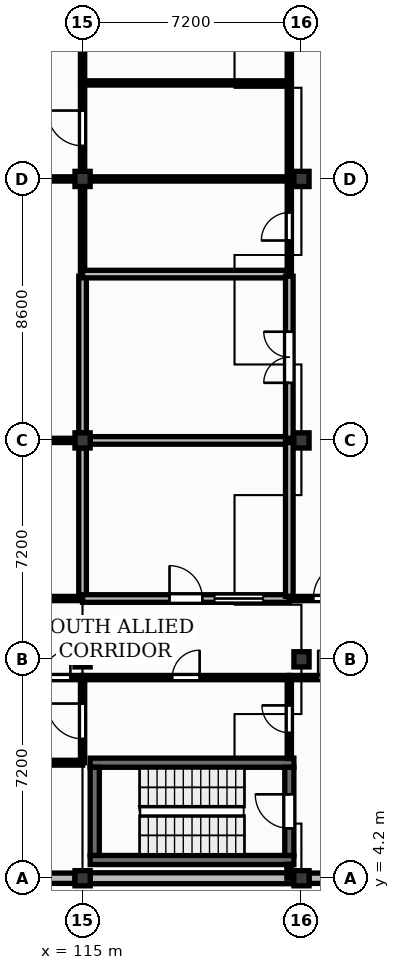
"""IFC4 building model, lengths in metres.
Left out: names, types, materials, properties, quantities, classifications, styles, units other than length and angle.
Written with IfcOpenShell. Run it as: python <this file> out.ifc"""

import sys

from ifc_helpers import new_model, si_unit, direction, frame, frame_2d, origin, origin_2d, place, context, subcontext, project, spatial, rectangle, extrude, element, fill, save


model = new_model("IFC4")
c1 = context("Model", 3, precision=1e-05, world=origin(), true_north=direction((0.0, 1.0)))
c2 = subcontext(c1, "Body", "Model", "MODEL_VIEW")
j1 = project(units=[si_unit("LENGTHUNIT", "METRE"), si_unit("PLANEANGLEUNIT", "RADIAN")], contexts=[c1])
p1 = place(None, origin())
s1 = spatial("IfcSite", under=j1, at=p1, CompositionType="ELEMENT")
p2 = place(p1, origin())
s2 = spatial("IfcBuilding", under=s1, at=p2, CompositionType="ELEMENT")
p3 = place(p2, frame((0.0, 0.0, 4.5)))
s3 = spatial("IfcBuildingStorey", under=s2, at=p3, CompositionType="ELEMENT", Elevation=4.5)
for number, where, z_axis, x_axis in (
    (1, (115.0, 4.2, 0.0), (0.0, 0.0, 1.0), (1.0, 0.0, 0.0)),
    (2, (115.0, 11.4, 0.0), (0.0, 0.0, 1.0), (1.0, 0.0, 0.0)),
    (3, (115.0, 18.6, 0.0), (0.0, 0.0, 1.0), (1.0, 0.0, 0.0)),
    (4, (115.0, 27.2, 0.0), (0.0, 0.0, 1.0), (1.0, 0.0, 0.0)),
    (5, (122.2, 4.2, 0.0), (0.0, 0.0, 1.0), (1.0, 0.0, 0.0)),
    (6, (122.2, 11.4, 0.0), (0.0, 0.0, 1.0), (1.0, 0.0, 0.0)),
    (7, (122.2, 18.6, 0.0), (0.0, 0.0, 1.0), (1.0, 0.0, 0.0)),
    (8, (122.2, 27.2, 0.0), (0.0, 0.0, 1.0), (1.0, 0.0, 0.0)),
):
    element("IfcColumn", number, at=place(p3, frame(where, z_axis=z_axis, x_axis=x_axis)), inside=s3, PredefinedType="COLUMN", context=c2, shape_type="SweptSolid", body=[
        extrude(rectangle(XDim=0.5, YDim=0.5, at=origin_2d()), origin(), (0.0, 0.0, 1.0), 4.22),
    ])
p4 = place(p3, frame((107.96, 4.2, 0.0), z_axis=(0.0, 0.0, 1.0), x_axis=(1.0, 0.0, 0.0)))
e9 = element("IfcWall", 9, at=p4, inside=s3, PredefinedType="SOLIDWALL", context=c2, shape_type="SweptSolid", body=[
    extrude(rectangle(XDim=6.79, YDim=0.34, at=frame_2d((3.395, 0.0))), origin(), (0.0, 0.0, 1.0), 3.76),
])
p5 = place(p4, frame((1.42, 0.0, 1.0)))
e10 = element("IfcOpeningElement", 10, at=p5, cuts=e9, PredefinedType="OPENING", context=c2, shape_type="SweptSolid", body=[
    extrude(rectangle(XDim=1.72, YDim=2.2, at=frame_2d((0.86, 1.1))), frame((0.0, 0.18, 0.0), z_axis=(0.0, -1.0, 0.0), x_axis=(1.0, 0.0, 0.0)), (0.0, 0.0, 1.0), 0.36),
])
p6 = place(p3, frame((115.25, 4.2, 0.0), z_axis=(0.0, 0.0, 1.0), x_axis=(1.0, 0.0, 0.0)))
e11 = element("IfcWall", 11, at=p6, inside=s3, PredefinedType="SOLIDWALL", context=c2, shape_type="SweptSolid", body=[
    extrude(rectangle(XDim=6.7, YDim=0.36, at=frame_2d((3.35, 0.0))), origin(), (0.0, 0.0, 1.0), 3.52),
])
p7 = place(p3, frame((122.45, 4.2, 0.0), z_axis=(0.0, 0.0, 1.0), x_axis=(1.0, 0.0, 0.0)))
e12 = element("IfcWall", 12, at=p7, inside=s3, PredefinedType="SOLIDWALL", context=c2, shape_type="SweptSolid", body=[
    extrude(rectangle(XDim=5.9, YDim=0.34, at=frame_2d((2.95, 0.0))), origin(), (0.0, 0.0, 1.0), 3.52),
])
p8 = place(p7, frame((3.39, 0.0, 1.5)))
e13 = element("IfcOpeningElement", 13, at=p8, cuts=e12, PredefinedType="OPENING", context=c2, shape_type="SweptSolid", body=[
    extrude(rectangle(XDim=1.15, YDim=1.25, at=frame_2d((0.575, 0.625))), frame((0.0, 0.18, 0.0), z_axis=(0.0, -1.0, 0.0), x_axis=(1.0, 0.0, 0.0)), (0.0, 0.0, 1.0), 0.36),
])
for number, where, z_axis, x_axis in (
    (14, (115.25, 4.8, 0.0), (0.0, 0.0, 1.0), (1.0, 0.0, 0.0)),
    (15, (115.25, 8.0, 0.0), (0.0, 0.0, 1.0), (1.0, 0.0, 0.0)),
):
    element("IfcWall", number, at=place(p3, frame(where, z_axis=z_axis, x_axis=x_axis)), inside=s3, PredefinedType="SHEAR", context=c2, shape_type="SweptSolid", body=[
        extrude(rectangle(XDim=6.7, YDim=0.3, at=frame_2d((3.35, 0.0))), origin(), (0.0, 0.0, 1.0), 4.25),
    ])
p9 = place(p3, frame((115.4, 4.95, 0.0), z_axis=(0.0, 0.0, 1.0), x_axis=(0.0, 1.0, 0.0)))
e16 = element("IfcWall", 16, at=p9, inside=s3, PredefinedType="SHEAR", context=c2, shape_type="SweptSolid", body=[
    extrude(rectangle(XDim=2.9, YDim=0.3, at=frame_2d((1.45, 0.0))), origin(), (0.0, 0.0, 1.0), 4.25),
])
p10 = place(p3, frame((121.8, 4.95, 0.0), z_axis=(0.0, 0.0, 1.0), x_axis=(0.0, 1.0, 0.0)))
e17 = element("IfcWall", 17, at=p10, inside=s3, PredefinedType="SHEAR", context=c2, shape_type="SweptSolid", body=[
    extrude(rectangle(XDim=2.9, YDim=0.3, at=frame_2d((1.45, 0.0))), origin(), (0.0, 0.0, 1.0), 4.25),
])
p11 = place(p10, frame((0.89, 0.0, 0.0)))
e18 = element("IfcOpeningElement", 18, at=p11, cuts=e17, PredefinedType="OPENING", context=c2, shape_type="SweptSolid", body=[
    extrude(rectangle(XDim=1.12, YDim=2.1, at=frame_2d((0.56, 1.05))), frame((0.0, 0.16, 0.0), z_axis=(0.0, -1.0, 0.0), x_axis=(1.0, 0.0, 0.0)), (0.0, 0.0, 1.0), 0.32),
])
p12 = place(p3, frame((110.6, 13.4, 0.0), z_axis=(0.0, 0.0, 1.0), x_axis=(1.0, 0.0, 0.0)))
e19 = element("IfcWall", 19, at=p12, inside=s3, PredefinedType="PARTITIONING", context=c2, shape_type="SweptSolid", body=[
    extrude(rectangle(XDim=4.4, YDim=0.14, at=frame_2d((2.2, 0.0))), origin(), (0.0, 0.0, 1.0), 4.18),
])
p13 = place(p3, frame((110.6, 18.6, 0.0), z_axis=(0.0, 0.0, 1.0), x_axis=(1.0, 0.0, 0.0)))
e20 = element("IfcWall", 20, at=p13, inside=s3, PredefinedType="PARTITIONING", context=c2, shape_type="SweptSolid", body=[
    extrude(rectangle(XDim=4.15, YDim=0.14, at=frame_2d((2.075, 0.0))), origin(), (0.0, 0.0, 1.0), 3.76),
])
p14 = place(p3, frame((110.6, 27.2, 0.0), z_axis=(0.0, 0.0, 1.0), x_axis=(1.0, 0.0, 0.0)))
e21 = element("IfcWall", 21, at=p14, inside=s3, PredefinedType="PARTITIONING", context=c2, shape_type="SweptSolid", body=[
    extrude(rectangle(XDim=4.15, YDim=0.14, at=frame_2d((2.075, 0.0))), origin(), (0.0, 0.0, 1.0), 3.87),
])
p15 = place(p3, frame((112.4, 10.8, 0.0), z_axis=(0.0, 0.0, 1.0), x_axis=(1.0, 0.0, 0.0)))
e22 = element("IfcWall", 22, at=p15, inside=s3, PredefinedType="PARTITIONING", context=c2, shape_type="SweptSolid", body=[
    extrude(rectangle(XDim=2.6, YDim=0.14, at=frame_2d((1.3, 0.0))), origin(), (0.0, 0.0, 1.0), 4.18),
])
p16 = place(p15, frame((0.4, 0.0, 0.0)))
e23 = element("IfcOpeningElement", 23, at=p16, cuts=e22, PredefinedType="OPENING", context=c2, shape_type="SweptSolid", body=[
    extrude(rectangle(XDim=1.8, YDim=2.3, at=frame_2d((0.9, 1.15))), frame((0.0, 0.08, 0.0), z_axis=(0.0, -1.0, 0.0), x_axis=(1.0, 0.0, 0.0)), (0.0, 0.0, 1.0), 0.16),
])
p17 = place(p3, frame((115.0, 8.0, 0.0), z_axis=(0.0, 0.0, 1.0), x_axis=(0.0, 1.0, 0.0)))
e24 = element("IfcWall", 24, at=p17, inside=s3, PredefinedType="PARTITIONING", context=c2, shape_type="SweptSolid", body=[
    extrude(rectangle(XDim=2.73, YDim=0.14, at=frame_2d((1.365, 0.0))), origin(), (0.0, 0.0, 1.0), 3.52),
])
p18 = place(p17, frame((0.785, 0.0, 0.0)))
e25 = element("IfcOpeningElement", 25, at=p18, cuts=e24, PredefinedType="OPENING", context=c2, shape_type="SweptSolid", body=[
    extrude(rectangle(XDim=1.16, YDim=2.1, at=frame_2d((0.58, 1.05))), frame((0.0, 0.08, 0.0), z_axis=(0.0, -1.0, 0.0), x_axis=(1.0, 0.0, 0.0)), (0.0, 0.0, 1.0), 0.16),
])
p19 = place(p3, frame((115.0, 10.8, 0.0), z_axis=(0.0, 0.0, 1.0), x_axis=(1.0, 0.0, 0.0)))
e26 = element("IfcWall", 26, at=p19, inside=s3, PredefinedType="PARTITIONING", context=c2, shape_type="SweptSolid", body=[
    extrude(rectangle(XDim=6.8, YDim=0.14, at=frame_2d((3.4, 0.0))), origin(), (0.0, 0.0, 1.0), 4.18),
])
p20 = place(p19, frame((2.95, 0.0, 0.0)))
e27 = element("IfcOpeningElement", 27, at=p20, cuts=e26, PredefinedType="OPENING", context=c2, shape_type="SweptSolid", body=[
    extrude(rectangle(XDim=0.9, YDim=2.1, at=frame_2d((0.45, 1.05))), frame((0.0, 0.08, 0.0), z_axis=(0.0, -1.0, 0.0), x_axis=(1.0, 0.0, 0.0)), (0.0, 0.0, 1.0), 0.16),
])
p21 = place(p3, frame((115.0, 13.47, 0.0), z_axis=(0.0, 0.0, 1.0), x_axis=(0.0, 1.0, 0.0)))
e28 = element("IfcWall", 28, at=p21, inside=s3, PredefinedType="SOLIDWALL", context=c2, shape_type="SweptSolid", body=[
    extrude(rectangle(XDim=4.88, YDim=0.25, at=frame_2d((2.44, 0.0))), origin(), (0.0, 0.0, 1.0), 3.52),
])
p22 = place(p3, frame((115.0, 13.4, 0.0), z_axis=(0.0, 0.0, 1.0), x_axis=(1.0, 0.0, 0.0)))
e29 = element("IfcWall", 29, at=p22, inside=s3, PredefinedType="SOLIDWALL", context=c2, shape_type="SweptSolid", body=[
    extrude(rectangle(XDim=6.8, YDim=0.25, at=frame_2d((3.4, 0.0))), origin(), (0.0, 0.0, 1.0), 4.18),
])
p23 = place(p22, frame((2.86, 0.0, 0.0)))
e30 = element("IfcOpeningElement", 30, at=p23, cuts=e29, PredefinedType="OPENING", context=c2, shape_type="SweptSolid", body=[
    extrude(rectangle(XDim=1.08, YDim=2.15, at=frame_2d((0.54, 1.075))), frame((0.0, 0.135, 0.0), z_axis=(0.0, -1.0, 0.0), x_axis=(1.0, 0.0, 0.0)), (0.0, 0.0, 1.0), 0.27),
])
p24 = place(p22, frame((4.34, 0.0, 1.05)))
e31 = element("IfcOpeningElement", 31, at=p24, cuts=e29, PredefinedType="OPENING", context=c2, shape_type="SweptSolid", body=[
    extrude(rectangle(XDim=1.6, YDim=1.1, at=frame_2d((0.8, 0.55))), frame((0.0, 0.135, 0.0), z_axis=(0.0, -1.0, 0.0), x_axis=(1.0, 0.0, 0.0)), (0.0, 0.0, 1.0), 0.27),
])
p25 = place(p3, frame((115.0, 18.85, 0.0), z_axis=(0.0, 0.0, 1.0), x_axis=(0.0, 1.0, 0.0)))
e32 = element("IfcWall", 32, at=p25, inside=s3, PredefinedType="SOLIDWALL", context=c2, shape_type="SweptSolid", body=[
    extrude(rectangle(XDim=5.15, YDim=0.25, at=frame_2d((2.575, 0.0))), origin(), (0.0, 0.0, 1.0), 3.52),
])
p26 = place(p3, frame((115.25, 18.6, 0.0), z_axis=(0.0, 0.0, 1.0), x_axis=(1.0, 0.0, 0.0)))
e33 = element("IfcWall", 33, at=p26, inside=s3, PredefinedType="SOLIDWALL", context=c2, shape_type="SweptSolid", body=[
    extrude(rectangle(XDim=6.55, YDim=0.25, at=frame_2d((3.275, 0.0))), origin(), (0.0, 0.0, 1.0), 3.52),
])
p27 = place(p3, frame((115.0, 24.14, 0.0), z_axis=(0.0, 0.0, 1.0), x_axis=(0.0, 1.0, 0.0)))
e34 = element("IfcWall", 34, at=p27, inside=s3, PredefinedType="PARTITIONING", context=c2, shape_type="SweptSolid", body=[
    extrude(rectangle(XDim=2.81, YDim=0.14, at=frame_2d((1.405, 0.0))), origin(), (0.0, 0.0, 1.0), 3.52),
])
p28 = place(p3, frame((115.0, 24.07, 0.0), z_axis=(0.0, 0.0, 1.0), x_axis=(1.0, 0.0, 0.0)))
e35 = element("IfcWall", 35, at=p28, inside=s3, PredefinedType="SOLIDWALL", context=c2, shape_type="SweptSolid", body=[
    extrude(rectangle(XDim=6.8, YDim=0.25, at=frame_2d((3.4, 0.0))), origin(), (0.0, 0.0, 1.0), 4.18),
])
p29 = place(p3, frame((115.0, 27.45, 0.0), z_axis=(0.0, 0.0, 1.0), x_axis=(0.0, 1.0, 0.0)))
e36 = element("IfcWall", 36, at=p29, inside=s3, PredefinedType="PARTITIONING", context=c2, shape_type="SweptSolid", body=[
    extrude(rectangle(XDim=2.838, YDim=0.14, at=frame_2d((1.419, 0.0))), origin(), (0.0, 0.0, 1.0), 3.52),
])
p30 = place(p29, frame((0.839, 0.0, 0.0)))
e37 = element("IfcOpeningElement", 37, at=p30, cuts=e36, PredefinedType="OPENING", context=c2, shape_type="SweptSolid", body=[
    extrude(rectangle(XDim=1.16, YDim=2.1, at=frame_2d((0.58, 1.05))), frame((0.0, 0.08, 0.0), z_axis=(0.0, -1.0, 0.0), x_axis=(1.0, 0.0, 0.0)), (0.0, 0.0, 1.0), 0.16),
])
p31 = place(p3, frame((115.25, 27.2, 0.0), z_axis=(0.0, 0.0, 1.0), x_axis=(1.0, 0.0, 0.0)))
e38 = element("IfcWall", 38, at=p31, inside=s3, PredefinedType="PARTITIONING", context=c2, shape_type="SweptSolid", body=[
    extrude(rectangle(XDim=6.55, YDim=0.14, at=frame_2d((3.275, 0.0))), origin(), (0.0, 0.0, 1.0), 3.52),
])
p32 = place(p3, frame((115.0, 30.428, 0.0), z_axis=(0.0, 0.0, 1.0), x_axis=(0.0, 1.0, 0.0)))
e39 = element("IfcWall", 39, at=p32, inside=s3, PredefinedType="PARTITIONING", context=c2, shape_type="SweptSolid", body=[
    extrude(rectangle(XDim=6.122, YDim=0.14, at=frame_2d((3.061, 0.0))), origin(), (0.0, 0.0, 1.0), 3.52),
])
p33 = place(p32, frame((2.161, 0.0, 0.0)))
e40 = element("IfcOpeningElement", 40, at=p33, cuts=e39, PredefinedType="OPENING", context=c2, shape_type="SweptSolid", body=[
    extrude(rectangle(XDim=1.8, YDim=2.3, at=frame_2d((0.9, 1.15))), frame((0.0, 0.08, 0.0), z_axis=(0.0, -1.0, 0.0), x_axis=(1.0, 0.0, 0.0)), (0.0, 0.0, 1.0), 0.16),
])
p34 = place(p3, frame((115.0, 30.358, 0.0), z_axis=(0.0, 0.0, 1.0), x_axis=(1.0, 0.0, 0.0)))
e41 = element("IfcWall", 41, at=p34, inside=s3, PredefinedType="PARTITIONING", context=c2, shape_type="SweptSolid", body=[
    extrude(rectangle(XDim=6.8, YDim=0.14, at=frame_2d((3.4, 0.0))), origin(), (0.0, 0.0, 1.0), 4.18),
])
p35 = place(p3, frame((121.8, 8.14, 0.0), z_axis=(0.0, 0.0, 1.0), x_axis=(0.0, 1.0, 0.0)))
e42 = element("IfcWall", 42, at=p35, inside=s3, PredefinedType="PARTITIONING", context=c2, shape_type="SweptSolid", body=[
    extrude(rectangle(XDim=2.59, YDim=0.14, at=frame_2d((1.295, 0.0))), origin(), (0.0, 0.0, 1.0), 4.18),
])
p36 = place(p35, frame((0.845, 0.0, 0.0)))
e43 = element("IfcOpeningElement", 43, at=p36, cuts=e42, PredefinedType="OPENING", context=c2, shape_type="SweptSolid", body=[
    extrude(rectangle(XDim=0.9, YDim=2.1, at=frame_2d((0.45, 1.05))), frame((0.0, 0.08, 0.0), z_axis=(0.0, -1.0, 0.0), x_axis=(1.0, 0.0, 0.0)), (0.0, 0.0, 1.0), 0.16),
])
p37 = place(p3, frame((121.8, 10.8, 0.0), z_axis=(0.0, 0.0, 1.0), x_axis=(1.0, 0.0, 0.0)))
e44 = element("IfcWall", 44, at=p37, inside=s3, PredefinedType="PARTITIONING", context=c2, shape_type="SweptSolid", body=[
    extrude(rectangle(XDim=2.8, YDim=0.14, at=frame_2d((1.4, 0.0))), origin(), (0.0, 0.0, 1.0), 4.18),
])
p38 = place(p37, frame((0.95, 0.0, 0.0)))
e45 = element("IfcOpeningElement", 45, at=p38, cuts=e44, PredefinedType="OPENING", context=c2, shape_type="SweptSolid", body=[
    extrude(rectangle(XDim=0.9, YDim=2.1, at=frame_2d((0.45, 1.05))), frame((0.0, 0.08, 0.0), z_axis=(0.0, -1.0, 0.0), x_axis=(1.0, 0.0, 0.0)), (0.0, 0.0, 1.0), 0.16),
])
p39 = place(p3, frame((121.8, 13.47, 0.0), z_axis=(0.0, 0.0, 1.0), x_axis=(0.0, 1.0, 0.0)))
e46 = element("IfcWall", 46, at=p39, inside=s3, PredefinedType="SOLIDWALL", context=c2, shape_type="SweptSolid", body=[
    extrude(rectangle(XDim=5.06, YDim=0.25, at=frame_2d((2.53, 0.0))), origin(), (0.0, 0.0, 1.0), 4.18),
])
p40 = place(p3, frame((121.8, 13.4, 0.0), z_axis=(0.0, 0.0, 1.0), x_axis=(1.0, 0.0, 0.0)))
e47 = element("IfcWall", 47, at=p40, inside=s3, PredefinedType="PARTITIONING", context=c2, shape_type="SweptSolid", body=[
    extrude(rectangle(XDim=2.8, YDim=0.14, at=frame_2d((1.4, 0.0))), origin(), (0.0, 0.0, 1.0), 4.18),
])
p41 = place(p40, frame((0.79, 0.0, 0.0)))
e48 = element("IfcOpeningElement", 48, at=p41, cuts=e47, PredefinedType="OPENING", context=c2, shape_type="SweptSolid", body=[
    extrude(rectangle(XDim=1.22, YDim=2.1, at=frame_2d((0.61, 1.05))), frame((0.0, 0.08, 0.0), z_axis=(0.0, -1.0, 0.0), x_axis=(1.0, 0.0, 0.0)), (0.0, 0.0, 1.0), 0.16),
])
p42 = place(p3, frame((121.8, 18.67, 0.0), z_axis=(0.0, 0.0, 1.0), x_axis=(0.0, 1.0, 0.0)))
e49 = element("IfcWall", 49, at=p42, inside=s3, PredefinedType="SOLIDWALL", context=c2, shape_type="SweptSolid", body=[
    extrude(rectangle(XDim=5.33, YDim=0.25, at=frame_2d((2.665, 0.0))), origin(), (0.0, 0.0, 1.0), 4.18),
])
p43 = place(p42, frame((1.825, 0.0, 0.0)))
e50 = element("IfcOpeningElement", 50, at=p43, cuts=e49, PredefinedType="OPENING", context=c2, shape_type="SweptSolid", body=[
    extrude(rectangle(XDim=1.68, YDim=2.3, at=frame_2d((0.84, 1.15))), frame((0.0, 0.135, 0.0), z_axis=(0.0, -1.0, 0.0), x_axis=(1.0, 0.0, 0.0)), (0.0, 0.0, 1.0), 0.27),
])
p44 = place(p3, frame((121.8, 24.14, 0.0), z_axis=(0.0, 0.0, 1.0), x_axis=(0.0, 1.0, 0.0)))
e51 = element("IfcWall", 51, at=p44, inside=s3, PredefinedType="PARTITIONING", context=c2, shape_type="SweptSolid", body=[
    extrude(rectangle(XDim=2.99, YDim=0.14, at=frame_2d((1.495, 0.0))), origin(), (0.0, 0.0, 1.0), 4.18),
])
p45 = place(p44, frame((1.035, 0.0, 0.0)))
e52 = element("IfcOpeningElement", 52, at=p45, cuts=e51, PredefinedType="OPENING", context=c2, shape_type="SweptSolid", body=[
    extrude(rectangle(XDim=0.92, YDim=2.1, at=frame_2d((0.46, 1.05))), frame((0.0, 0.08, 0.0), z_axis=(0.0, -1.0, 0.0), x_axis=(1.0, 0.0, 0.0)), (0.0, 0.0, 1.0), 0.16),
])
p46 = place(p3, frame((121.8, 27.27, 0.0), z_axis=(0.0, 0.0, 1.0), x_axis=(0.0, 1.0, 0.0)))
e53 = element("IfcWall", 53, at=p46, inside=s3, PredefinedType="PARTITIONING", context=c2, shape_type="SweptSolid", body=[
    extrude(rectangle(XDim=3.018, YDim=0.14, at=frame_2d((1.509, 0.0))), origin(), (0.0, 0.0, 1.0), 4.18),
])
p47 = place(p3, frame((121.8, 30.428, 0.0), z_axis=(0.0, 0.0, 1.0), x_axis=(0.0, 1.0, 0.0)))
e54 = element("IfcWall", 54, at=p47, inside=s3, PredefinedType="PARTITIONING", context=c2, shape_type="SweptSolid", body=[
    extrude(rectangle(XDim=6.302, YDim=0.14, at=frame_2d((3.151, 0.0))), origin(), (0.0, 0.0, 1.0), 4.18),
])
p48 = place(p3, frame((121.8, 4.2, 0.0), z_axis=(0.0, 0.0, 1.0), x_axis=(0.0, 1.0, 0.0)))
e55 = element("IfcWall", 55, at=p48, inside=s3, PredefinedType="PARTITIONING", context=c2, shape_type="SweptSolid", body=[
    extrude(rectangle(XDim=0.46, YDim=0.16, at=frame_2d((0.23, 0.0))), origin(), (0.0, 0.0, 1.0), 4.18),
])
p49 = place(p3, frame((112.4, 8.0, 0.0), z_axis=(0.0, 0.0, 1.0), x_axis=(1.0, 0.0, 0.0)))
e56 = element("IfcWall", 56, at=p49, inside=s3, PredefinedType="PARTITIONING", context=c2, shape_type="SweptSolid", body=[
    extrude(rectangle(XDim=2.6, YDim=0.16, at=frame_2d((1.3, 0.0))), origin(), (0.0, 0.0, 1.0), 4.18),
])
p50 = place(p11, origin())
e57 = element("IfcDoor", 57, at=p50, inside=s3, OperationType="SINGLE_SWING_RIGHT", PredefinedType="DOOR", context=c2, shape_type="SweptSolid", body=[
    extrude(rectangle(XDim=1.12, YDim=2.1, at=frame_2d((0.56, 1.05))), frame((0.0, 0.025, 0.0), z_axis=(0.0, -1.0, 0.0), x_axis=(1.0, 0.0, 0.0)), (0.0, 0.0, 1.0), 0.05),
])
fill(e18, e57)
p51 = place(p38, origin())
e58 = element("IfcDoor", 58, at=p51, inside=s3, OperationType="SINGLE_SWING_LEFT", PredefinedType="DOOR", context=c2, shape_type="SweptSolid", body=[
    extrude(rectangle(XDim=0.9, YDim=2.1, at=frame_2d((0.45, 1.05))), frame((0.0, 0.025, 0.0), z_axis=(0.0, -1.0, 0.0), x_axis=(1.0, 0.0, 0.0)), (0.0, 0.0, 1.0), 0.05),
])
fill(e45, e58)
p52 = place(p41, origin())
e59 = element("IfcDoor", 59, at=p52, inside=s3, OperationType="SINGLE_SWING_RIGHT", PredefinedType="DOOR", context=c2, shape_type="SweptSolid", body=[
    extrude(rectangle(XDim=1.22, YDim=2.1, at=frame_2d((0.61, 1.05))), frame((0.0, 0.025, 0.0), z_axis=(0.0, -1.0, 0.0), x_axis=(1.0, 0.0, 0.0)), (0.0, 0.0, 1.0), 0.05),
])
fill(e48, e59)
p53 = place(p16, origin())
e60 = element("IfcDoor", 60, at=p53, inside=s3, OperationType="DOUBLE_DOOR_SINGLE_SWING", PredefinedType="DOOR", context=c2, shape_type="SweptSolid", body=[
    extrude(rectangle(XDim=1.8, YDim=2.3, at=frame_2d((0.9, 1.15))), frame((0.0, 0.025, 0.0), z_axis=(0.0, -1.0, 0.0), x_axis=(1.0, 0.0, 0.0)), (0.0, 0.0, 1.0), 0.05),
])
fill(e23, e60)
p54 = place(p20, origin())
e61 = element("IfcDoor", 61, at=p54, inside=s3, OperationType="SINGLE_SWING_RIGHT", PredefinedType="DOOR", context=c2, shape_type="SweptSolid", body=[
    extrude(rectangle(XDim=0.9, YDim=2.1, at=frame_2d((0.45, 1.05))), frame((0.0, 0.025, 0.0), z_axis=(0.0, -1.0, 0.0), x_axis=(1.0, 0.0, 0.0)), (0.0, 0.0, 1.0), 0.05),
])
fill(e27, e61)
p55 = place(p36, origin())
e62 = element("IfcDoor", 62, at=p55, inside=s3, OperationType="SINGLE_SWING_RIGHT", PredefinedType="DOOR", context=c2, shape_type="SweptSolid", body=[
    extrude(rectangle(XDim=0.9, YDim=2.1, at=frame_2d((0.45, 1.05))), frame((0.0, 0.025, 0.0), z_axis=(0.0, -1.0, 0.0), x_axis=(1.0, 0.0, 0.0)), (0.0, 0.0, 1.0), 0.05),
])
fill(e43, e62)
p56 = place(p18, origin())
e63 = element("IfcDoor", 63, at=p56, inside=s3, OperationType="SINGLE_SWING_RIGHT", PredefinedType="DOOR", context=c2, shape_type="SweptSolid", body=[
    extrude(rectangle(XDim=1.16, YDim=2.1, at=frame_2d((0.58, 1.05))), frame((0.0, 0.025, 0.0), z_axis=(0.0, -1.0, 0.0), x_axis=(1.0, 0.0, 0.0)), (0.0, 0.0, 1.0), 0.05),
])
fill(e25, e63)
p57 = place(p23, origin())
e64 = element("IfcDoor", 64, at=p57, inside=s3, OperationType="SINGLE_SWING_LEFT", PredefinedType="DOOR", context=c2, shape_type="SweptSolid", body=[
    extrude(rectangle(XDim=1.08, YDim=2.15, at=frame_2d((0.54, 1.075))), frame((0.0, 0.025, 0.0), z_axis=(0.0, -1.0, 0.0), x_axis=(1.0, 0.0, 0.0)), (0.0, 0.0, 1.0), 0.05),
])
fill(e30, e64)
p58 = place(p24, origin())
e65 = element("IfcWindow", 65, at=p58, inside=s3, PartitioningType="SINGLE_PANEL", PredefinedType="WINDOW", context=c2, shape_type="SweptSolid", body=[
    extrude(rectangle(XDim=1.6, YDim=1.1, at=frame_2d((0.8, 0.55))), frame((0.0, 0.03, 0.0), z_axis=(0.0, -1.0, 0.0), x_axis=(1.0, 0.0, 0.0)), (0.0, 0.0, 1.0), 0.06),
])
fill(e31, e65)
p59 = place(p43, origin())
e66 = element("IfcDoor", 66, at=p59, inside=s3, OperationType="DOUBLE_DOOR_SINGLE_SWING", PredefinedType="DOOR", context=c2, shape_type="SweptSolid", body=[
    extrude(rectangle(XDim=1.68, YDim=2.3, at=frame_2d((0.84, 1.15))), frame((0.0, 0.025, 0.0), z_axis=(0.0, -1.0, 0.0), x_axis=(1.0, 0.0, 0.0)), (0.0, 0.0, 1.0), 0.05),
])
fill(e50, e66)
p60 = place(p45, origin())
e67 = element("IfcDoor", 67, at=p60, inside=s3, OperationType="SINGLE_SWING_LEFT", PredefinedType="DOOR", context=c2, shape_type="SweptSolid", body=[
    extrude(rectangle(XDim=0.92, YDim=2.1, at=frame_2d((0.46, 1.05))), frame((0.0, 0.025, 0.0), z_axis=(0.0, -1.0, 0.0), x_axis=(1.0, 0.0, 0.0)), (0.0, 0.0, 1.0), 0.05),
])
fill(e52, e67)
p61 = place(p30, origin())
e68 = element("IfcDoor", 68, at=p61, inside=s3, OperationType="SINGLE_SWING_RIGHT", PredefinedType="DOOR", context=c2, shape_type="SweptSolid", body=[
    extrude(rectangle(XDim=1.16, YDim=2.1, at=frame_2d((0.58, 1.05))), frame((0.0, 0.025, 0.0), z_axis=(0.0, -1.0, 0.0), x_axis=(1.0, 0.0, 0.0)), (0.0, 0.0, 1.0), 0.05),
])
fill(e37, e68)
save(model, sys.argv[1])
